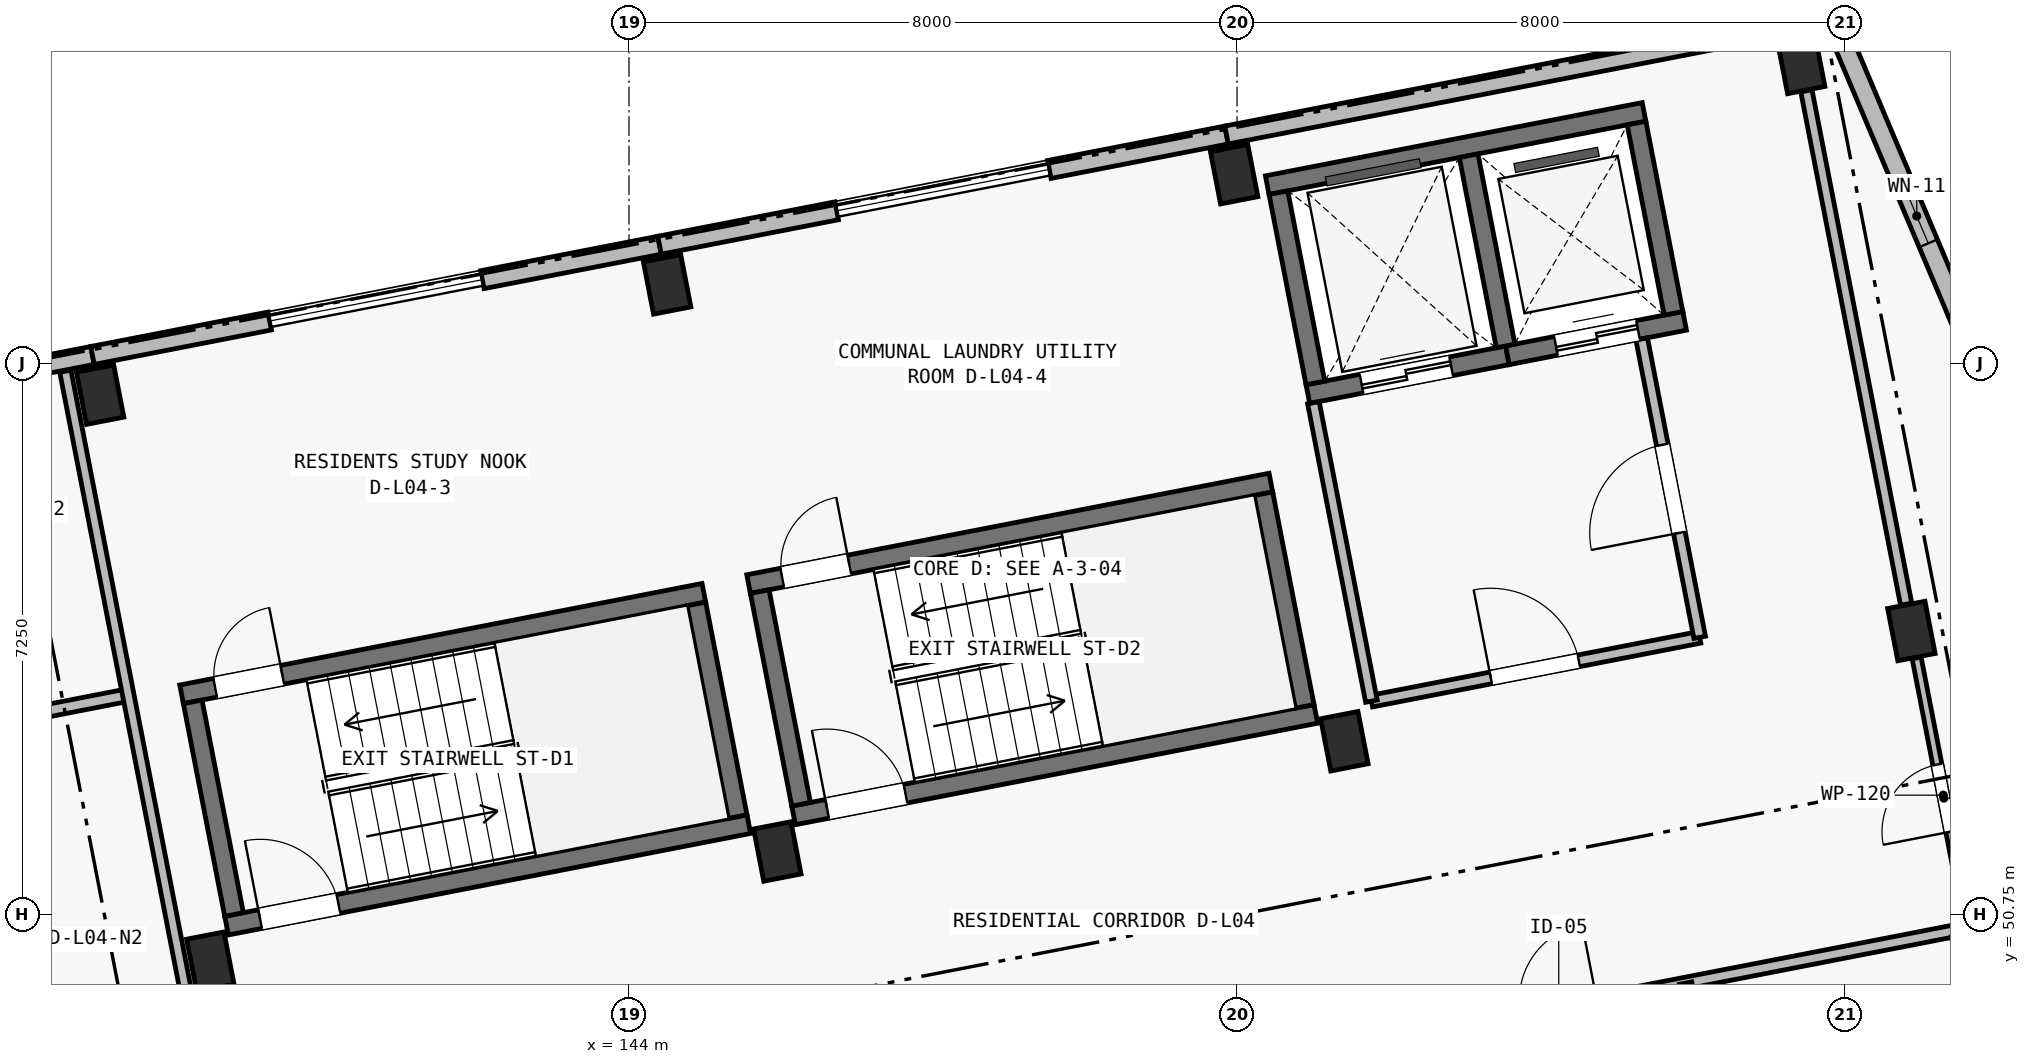
"""IFC4 building model, lengths in metres.
Left out: names, types, materials, properties, quantities, classifications, styles, units other than length and angle.
Written with IfcOpenShell. Run it as: python <this file> out.ifc"""

import sys

from ifc_helpers import new_model, si_unit, direction, frame, frame_2d, origin, origin_2d, place, context, subcontext, project, spatial, rectangle, extrude, element, fill, save


model = new_model("IFC4")
c1 = context("Model", 3, precision=1e-05, world=origin(), true_north=direction((0.0, 1.0)))
c2 = subcontext(c1, "Body", "Model", "MODEL_VIEW")
j1 = project(units=[si_unit("LENGTHUNIT", "METRE"), si_unit("PLANEANGLEUNIT", "RADIAN")], contexts=[c1])
p1 = place(None, origin())
s1 = spatial("IfcSite", under=j1, at=p1, CompositionType="ELEMENT")
p2 = place(p1, origin())
s2 = spatial("IfcBuilding", under=s1, at=p2, CompositionType="ELEMENT")
p3 = place(p2, frame((0.0, 0.0, 14.9)))
s3 = spatial("IfcBuildingStorey", under=s2, at=p3, CompositionType="ELEMENT", Elevation=14.9)
for number, where, z_axis, x_axis in (
    (1, (138.491, 50.13, 0.0), (0.0, 0.0, 1.0), (0.982, 0.191, 0.0)),
    (2, (137.041, 57.59, 0.0), (0.0, 0.0, 1.0), (0.982, 0.191, 0.0)),
    (3, (145.952, 51.58, 0.0), (0.0, 0.0, 1.0), (0.982, 0.191, 0.0)),
    (4, (144.502, 59.041, 0.0), (0.0, 0.0, 1.0), (0.982, 0.191, 0.0)),
    (5, (153.412, 53.03, 0.0), (0.0, 0.0, 1.0), (0.982, 0.191, 0.0)),
    (6, (151.962, 60.491, 0.0), (0.0, 0.0, 1.0), (0.982, 0.191, 0.0)),
    (7, (160.873, 54.48, 0.0), (0.0, 0.0, 1.0), (0.982, 0.191, 0.0)),
    (8, (159.422, 61.941, 0.0), (0.0, 0.0, 1.0), (0.982, 0.191, 0.0)),
):
    element("IfcColumn", number, at=place(p3, frame(where, z_axis=z_axis, x_axis=x_axis)), inside=s3, PredefinedType="COLUMN", context=c2, shape_type="SweptSolid", body=[
        extrude(rectangle(XDim=0.5, YDim=0.7, at=origin_2d()), origin(), (0.0, 0.0, 1.0), 3.25),
    ])
p4 = place(p3, frame((152.397, 60.346, 0.0), z_axis=(0.0, 0.0, 1.0), x_axis=(0.981635261308, 0.190767433692, 0.0)))
e9 = element("IfcWall", 9, at=p4, inside=s3, PredefinedType="SHEAR", context=c2, shape_type="SweptSolid", body=[
    extrude(rectangle(XDim=5.05, YDim=0.25, at=frame_2d((2.525, 0.0))), origin(), (0.0, 0.0, 1.0), 3.25),
])
p5 = place(p3, frame((152.932, 57.598, 0.0), z_axis=(0.0, 0.0, 1.0), x_axis=(0.981636759622, 0.190759723627, 0.0)))
e10 = element("IfcWall", 10, at=p5, inside=s3, PredefinedType="SHEAR", context=c2, shape_type="SweptSolid", body=[
    extrude(rectangle(XDim=2.675, YDim=0.25, at=frame_2d((1.337, 0.0))), origin(), (0.0, 0.0, 1.0), 3.25),
])
p6 = place(p5, frame((0.72, 0.0, 0.0)))
e11 = element("IfcOpeningElement", 11, at=p6, cuts=e10, PredefinedType="OPENING", context=c2, shape_type="SweptSolid", body=[
    extrude(rectangle(XDim=1.2, YDim=2.2, at=frame_2d((0.6, 1.1))), frame((0.0, 0.14, 0.0), z_axis=(0.0, -1.0, 0.0), x_axis=(1.0, 0.0, 0.0)), (0.0, 0.0, 1.0), 0.28),
])
p7 = place(p3, frame((155.558, 58.108, 0.0), z_axis=(0.0, 0.0, 1.0), x_axis=(0.981633573872, 0.190776116556, 0.0)))
e12 = element("IfcWall", 12, at=p7, inside=s3, PredefinedType="SHEAR", context=c2, shape_type="SweptSolid", body=[
    extrude(rectangle(XDim=2.375, YDim=0.25, at=frame_2d((1.188, 0.0))), origin(), (0.0, 0.0, 1.0), 3.25),
])
p8 = place(p7, frame((0.65, 0.0, 0.0)))
e13 = element("IfcOpeningElement", 13, at=p8, cuts=e12, PredefinedType="OPENING", context=c2, shape_type="SweptSolid", body=[
    extrude(rectangle(XDim=1.1, YDim=2.15, at=frame_2d((0.55, 1.075))), frame((0.0, 0.14, 0.0), z_axis=(0.0, -1.0, 0.0), x_axis=(1.0, 0.0, 0.0)), (0.0, 0.0, 1.0), 0.28),
])
for number, where, z_axis, x_axis in (
    (14, (153.031, 57.744, 0.0), (0.0, 0.0, 1.0), (-0.191, 0.982, 0.0)),
    (15, (155.534, 58.231, 0.0), (0.0, 0.0, 1.0), (-0.191, 0.982, 0.0)),
    (16, (157.742, 58.66, 0.0), (0.0, 0.0, 1.0), (-0.191, 0.982, 0.0)),
):
    element("IfcWall", number, at=place(p3, frame(where, z_axis=z_axis, x_axis=x_axis)), inside=s3, PredefinedType="SHEAR", context=c2, shape_type="SweptSolid", body=[
        extrude(rectangle(XDim=2.55, YDim=0.25, at=frame_2d((1.275, 0.0))), origin(), (0.0, 0.0, 1.0), 3.25),
    ])
p9 = place(p3, frame((138.113, 53.647, 0.0), z_axis=(0.0, 0.0, 1.0), x_axis=(0.981626097708, 0.19081458094, 0.0)))
e17 = element("IfcWall", 17, at=p9, inside=s3, PredefinedType="SHEAR", context=c2, shape_type="SweptSolid", body=[
    extrude(rectangle(XDim=7.0, YDim=0.25, at=frame_2d((3.5, 0.0))), origin(), (0.0, 0.0, 1.0), 3.25),
])
p10 = place(p9, frame((0.45, 0.0, 0.0)))
e18 = element("IfcOpeningElement", 18, at=p10, cuts=e17, PredefinedType="OPENING", context=c2, shape_type="SweptSolid", body=[
    extrude(rectangle(XDim=0.9, YDim=2.1, at=frame_2d((0.45, 1.05))), frame((0.0, 0.14, 0.0), z_axis=(0.0, -1.0, 0.0), x_axis=(1.0, 0.0, 0.0)), (0.0, 0.0, 1.0), 0.28),
])
p11 = place(p3, frame((138.705, 50.604, 0.0), z_axis=(0.0, 0.0, 1.0), x_axis=(0.981626097708, 0.19081458094, 0.0)))
e19 = element("IfcWall", 19, at=p11, inside=s3, PredefinedType="SHEAR", context=c2, shape_type="SweptSolid", body=[
    extrude(rectangle(XDim=7.0, YDim=0.25, at=frame_2d((3.5, 0.0))), origin(), (0.0, 0.0, 1.0), 3.25),
])
p12 = place(p11, frame((0.45, 0.0, 0.0)))
e20 = element("IfcOpeningElement", 20, at=p12, cuts=e19, PredefinedType="OPENING", context=c2, shape_type="SweptSolid", body=[
    extrude(rectangle(XDim=1.05, YDim=2.15, at=frame_2d((0.525, 1.075))), frame((0.0, 0.14, 0.0), z_axis=(0.0, -1.0, 0.0), x_axis=(1.0, 0.0, 0.0)), (0.0, 0.0, 1.0), 0.28),
])
p13 = place(p3, frame((138.804, 50.751, 0.0), z_axis=(0.0, 0.0, 1.0), x_axis=(-0.190858194834, 0.981617618762, 0.0)))
e21 = element("IfcWall", 21, at=p13, inside=s3, PredefinedType="SHEAR", context=c2, shape_type="SweptSolid", body=[
    extrude(rectangle(XDim=2.85, YDim=0.25, at=frame_2d((1.425, 0.0))), origin(), (0.0, 0.0, 1.0), 3.25),
])
p14 = place(p3, frame((145.43, 52.039, 0.0), z_axis=(0.0, 0.0, 1.0), x_axis=(-0.190842147128, 0.981620738819, 0.0)))
e22 = element("IfcWall", 22, at=p14, inside=s3, PredefinedType="SHEAR", context=c2, shape_type="SweptSolid", body=[
    extrude(rectangle(XDim=2.85, YDim=0.25, at=frame_2d((1.425, 0.0))), origin(), (0.0, 0.0, 1.0), 3.25),
])
p15 = place(p3, frame((145.574, 55.098, 0.0), z_axis=(0.0, 0.0, 1.0), x_axis=(0.981626097708, 0.19081458094, 0.0)))
e23 = element("IfcWall", 23, at=p15, inside=s3, PredefinedType="SHEAR", context=c2, shape_type="SweptSolid", body=[
    extrude(rectangle(XDim=7.0, YDim=0.25, at=frame_2d((3.5, 0.0))), origin(), (0.0, 0.0, 1.0), 3.25),
])
p16 = place(p15, frame((0.45, 0.0, 0.0)))
e24 = element("IfcOpeningElement", 24, at=p16, cuts=e23, PredefinedType="OPENING", context=c2, shape_type="SweptSolid", body=[
    extrude(rectangle(XDim=0.9, YDim=2.1, at=frame_2d((0.45, 1.05))), frame((0.0, 0.14, 0.0), z_axis=(0.0, -1.0, 0.0), x_axis=(1.0, 0.0, 0.0)), (0.0, 0.0, 1.0), 0.28),
])
p17 = place(p3, frame((146.165, 52.054, 0.0), z_axis=(0.0, 0.0, 1.0), x_axis=(0.981627367538, 0.190808048312, 0.0)))
e25 = element("IfcWall", 25, at=p17, inside=s3, PredefinedType="SHEAR", context=c2, shape_type="SweptSolid", body=[
    extrude(rectangle(XDim=7.0, YDim=0.25, at=frame_2d((3.5, 0.0))), origin(), (0.0, 0.0, 1.0), 3.25),
])
p18 = place(p17, frame((0.45, 0.0, 0.0)))
e26 = element("IfcOpeningElement", 26, at=p18, cuts=e25, PredefinedType="OPENING", context=c2, shape_type="SweptSolid", body=[
    extrude(rectangle(XDim=1.05, YDim=2.15, at=frame_2d((0.525, 1.075))), frame((0.0, 0.14, 0.0), z_axis=(0.0, -1.0, 0.0), x_axis=(1.0, 0.0, 0.0)), (0.0, 0.0, 1.0), 0.28),
])
for number, where, z_axis, x_axis in (
    (27, (146.264, 52.201, 0.0), (0.0, 0.0, 1.0), (-0.191, 0.982, 0.0)),
    (28, (152.89, 53.489, 0.0), (0.0, 0.0, 1.0), (-0.191, 0.982, 0.0)),
):
    element("IfcWall", number, at=place(p3, frame(where, z_axis=z_axis, x_axis=x_axis)), inside=s3, PredefinedType="SHEAR", context=c2, shape_type="SweptSolid", body=[
        extrude(rectangle(XDim=2.85, YDim=0.25, at=frame_2d((1.425, 0.0))), origin(), (0.0, 0.0, 1.0), 3.25),
    ])
p19 = place(p3, frame((129.481, 56.656, 0.0), z_axis=(0.0, 0.0, 1.0), x_axis=(0.981626422232, 0.190812911449, 0.0)))
e29 = element("IfcWall", 29, at=p19, inside=s3, PredefinedType="SOLIDWALL", context=c2, shape_type="SweptSolid", body=[
    extrude(rectangle(XDim=7.6, YDim=0.24, at=frame_2d((3.8, 0.0))), origin(), (0.0, 0.0, 1.0), 3.0),
])
p20 = place(p19, frame((1.745, 0.0, 0.44)))
e30 = element("IfcOpeningElement", 30, at=p20, cuts=e29, PredefinedType="OPENING", context=c2, shape_type="SweptSolid", body=[
    extrude(rectangle(XDim=0.82, YDim=2.18, at=frame_2d((0.41, 1.09))), frame((0.0, 0.135, 0.0), z_axis=(0.0, -1.0, 0.0), x_axis=(1.0, 0.0, 0.0)), (0.0, 0.0, 1.0), 0.27),
])
p21 = place(p19, frame((5.05, 0.0, 0.5)))
e31 = element("IfcOpeningElement", 31, at=p21, cuts=e29, PredefinedType="OPENING", context=c2, shape_type="SweptSolid", body=[
    extrude(rectangle(XDim=0.6, YDim=2.22, at=frame_2d((0.3, 1.11))), frame((0.0, 0.135, 0.0), z_axis=(0.0, -1.0, 0.0), x_axis=(1.0, 0.0, 0.0)), (0.0, 0.0, 1.0), 0.27),
])
for number, where, z_axis, x_axis in (
    (32, (136.941, 58.106, 0.0), (0.0, 0.0, 1.0), (0.982, 0.191, 0.0)),
    (33, (142.07, 59.103, 0.0), (0.0, 0.0, 1.0), (0.982, 0.191, 0.0)),
):
    element("IfcWall", number, at=place(p3, frame(where, z_axis=z_axis, x_axis=x_axis)), inside=s3, PredefinedType="SOLIDWALL", context=c2, shape_type="SweptSolid", body=[
        extrude(rectangle(XDim=2.375, YDim=0.24, at=frame_2d((1.188, 0.0))), origin(), (0.0, 0.0, 1.0), 3.0),
    ])
p22 = place(p3, frame((144.401, 59.556, 0.0), z_axis=(0.0, 0.0, 1.0), x_axis=(0.981633573872, 0.190776116556, 0.0)))
e34 = element("IfcWall", 34, at=p22, inside=s3, PredefinedType="SOLIDWALL", context=c2, shape_type="SweptSolid", body=[
    extrude(rectangle(XDim=2.375, YDim=0.24, at=frame_2d((1.188, 0.0))), origin(), (0.0, 0.0, 1.0), 3.0),
])
p23 = place(p3, frame((149.531, 60.553, 0.0), z_axis=(0.0, 0.0, 1.0), x_axis=(0.98161057432, 0.190894422087, 0.0)))
e35 = element("IfcWall", 35, at=p23, inside=s3, PredefinedType="SOLIDWALL", context=c2, shape_type="SweptSolid", body=[
    extrude(rectangle(XDim=2.375, YDim=0.24, at=frame_2d((1.188, 0.0))), origin(), (0.0, 0.0, 1.0), 3.0),
])
p24 = place(p3, frame((151.862, 61.006, 0.0), z_axis=(0.0, 0.0, 1.0), x_axis=(0.981627273155, 0.190808533872, 0.0)))
e36 = element("IfcWall", 36, at=p24, inside=s3, PredefinedType="SOLIDWALL", context=c2, shape_type="SweptSolid", body=[
    extrude(rectangle(XDim=8.125, YDim=0.24, at=frame_2d((4.062, 0.0))), origin(), (0.0, 0.0, 1.0), 3.0),
])
p25 = place(p3, frame((159.837, 62.556, 0.0), z_axis=(0.0, 0.0, 1.0), x_axis=(0.389225507936, -0.921142499276, 0.0)))
e37 = element("IfcWall", 37, at=p25, inside=s3, PredefinedType="SOLIDWALL", context=c2, shape_type="SweptSolid", body=[
    extrude(rectangle(XDim=17.91, YDim=0.26, at=frame_2d((8.955, 0.0))), origin(), (0.0, 0.0, 1.0), 3.0),
])
p26 = place(p25, frame((2.45, 0.0, 0.45)))
e38 = element("IfcOpeningElement", 38, at=p26, cuts=e37, PredefinedType="OPENING", context=c2, shape_type="SweptSolid", body=[
    extrude(rectangle(XDim=0.78, YDim=2.2, at=frame_2d((0.39, 1.1))), frame((0.0, 0.145, 0.0), z_axis=(0.0, -1.0, 0.0), x_axis=(1.0, 0.0, 0.0)), (0.0, 0.0, 1.0), 0.29),
])
p27 = place(p25, frame((14.84, 0.0, 0.52)))
e39 = element("IfcOpeningElement", 39, at=p27, cuts=e37, PredefinedType="OPENING", context=c2, shape_type="SweptSolid", body=[
    extrude(rectangle(XDim=0.62, YDim=2.28, at=frame_2d((0.31, 1.14))), frame((0.0, 0.145, 0.0), z_axis=(0.0, -1.0, 0.0), x_axis=(1.0, 0.0, 0.0)), (0.0, 0.0, 1.0), 0.29),
])
p28 = place(p3, frame((153.768, 53.558, 0.0), z_axis=(0.0, 0.0, 1.0), x_axis=(0.981624918225, 0.190820648566, 0.0)))
e40 = element("IfcWall", 40, at=p28, inside=s3, PredefinedType="PARTITIONING", context=c2, shape_type="SweptSolid", body=[
    extrude(rectangle(XDim=4.4, YDim=0.155, at=frame_2d((2.2, 0.0))), origin(), (0.0, 0.0, 1.0), 2.97),
])
p29 = place(p28, frame((1.6, 0.0, 0.0)))
e41 = element("IfcOpeningElement", 41, at=p29, cuts=e40, PredefinedType="OPENING", context=c2, shape_type="SweptSolid", body=[
    extrude(rectangle(XDim=1.18, YDim=2.15, at=frame_2d((0.59, 1.075))), frame((0.0, 0.093, 0.0), z_axis=(0.0, -1.0, 0.0), x_axis=(1.0, 0.0, 0.0)), (0.0, 0.0, 1.0), 0.185),
])
p30 = place(p3, frame((153.768, 53.558, 0.0), z_axis=(0.0, 0.0, 1.0), x_axis=(-0.19085495634, 0.981618248425, 0.0)))
e42 = element("IfcWall", 42, at=p30, inside=s3, PredefinedType="PARTITIONING", context=c2, shape_type="SweptSolid", body=[
    extrude(rectangle(XDim=4.0, YDim=0.155, at=frame_2d((2.0, 0.0))), origin(), (0.0, 0.0, 1.0), 2.97),
])
p31 = place(p3, frame((158.087, 54.397, 0.0), z_axis=(0.0, 0.0, 1.0), x_axis=(-0.190796144009, 0.981629681413, 0.0)))
e43 = element("IfcWall", 43, at=p31, inside=s3, PredefinedType="PARTITIONING", context=c2, shape_type="SweptSolid", body=[
    extrude(rectangle(XDim=4.0, YDim=0.155, at=frame_2d((2.0, 0.0))), origin(), (0.0, 0.0, 1.0), 2.97),
])
p32 = place(p31, frame((1.4, 0.0, 0.0)))
e44 = element("IfcOpeningElement", 44, at=p32, cuts=e43, PredefinedType="OPENING", context=c2, shape_type="SweptSolid", body=[
    extrude(rectangle(XDim=1.18, YDim=2.15, at=frame_2d((0.59, 1.075))), frame((0.0, 0.093, 0.0), z_axis=(0.0, -1.0, 0.0), x_axis=(1.0, 0.0, 0.0)), (0.0, 0.0, 1.0), 0.185),
])
p33 = place(p3, frame((161.643, 50.515, 0.0), z_axis=(0.0, 0.0, 1.0), x_axis=(-0.190805731561, 0.981627817864, 0.0)))
e45 = element("IfcWall", 45, at=p33, inside=s3, PredefinedType="PARTITIONING", context=c2, shape_type="SweptSolid", body=[
    extrude(rectangle(XDim=3.68, YDim=0.12, at=frame_2d((1.84, 0.0))), origin(), (0.0, 0.0, 1.0), 2.5),
])
p34 = place(p33, frame((1.35, 0.0, 0.0)))
e46 = element("IfcOpeningElement", 46, at=p34, cuts=e45, PredefinedType="OPENING", context=c2, shape_type="SweptSolid", body=[
    extrude(rectangle(XDim=0.9, YDim=2.1, at=frame_2d((0.45, 1.05))), frame((0.0, 0.075, 0.0), z_axis=(0.0, -1.0, 0.0), x_axis=(1.0, 0.0, 0.0)), (0.0, 0.0, 1.0), 0.15),
])
p35 = place(p3, frame((160.804, 54.834, 0.0), z_axis=(0.0, 0.0, 1.0), x_axis=(-0.190804123115, 0.981628130507, 0.0)))
e47 = element("IfcWall", 47, at=p35, inside=s3, PredefinedType="PARTITIONING", context=c2, shape_type="SweptSolid", body=[
    extrude(rectangle(XDim=6.88, YDim=0.15, at=frame_2d((3.44, 0.0))), origin(), (0.0, 0.0, 1.0), 2.5),
])
p36 = place(p3, frame((154.427, 49.173, 0.0), z_axis=(0.0, 0.0, 1.0), x_axis=(0.981626748283, 0.190811234092, 0.0)))
e48 = element("IfcWall", 48, at=p36, inside=s3, PredefinedType="PARTITIONING", context=c2, shape_type="SweptSolid", body=[
    extrude(rectangle(XDim=7.27, YDim=0.155, at=frame_2d((3.635, 0.0))), origin(), (0.0, 0.0, 1.0), 2.97),
])
p37 = place(p36, frame((1.33, 0.0, 0.0)))
e49 = element("IfcOpeningElement", 49, at=p37, cuts=e48, PredefinedType="OPENING", context=c2, shape_type="SweptSolid", body=[
    extrude(rectangle(XDim=1.02, YDim=2.2, at=frame_2d((0.51, 1.1))), frame((0.0, 0.093, 0.0), z_axis=(0.0, -1.0, 0.0), x_axis=(1.0, 0.0, 0.0)), (0.0, 0.0, 1.0), 0.185),
])
p38 = place(p3, frame((158.612, 46.197, 0.0), z_axis=(0.0, 0.0, 1.0), x_axis=(-0.190850336204, 0.981619146701, 0.0)))
e50 = element("IfcWall", 50, at=p38, inside=s3, PredefinedType="PLUMBINGWALL", context=c2, shape_type="SweptSolid", body=[
    extrude(rectangle(XDim=3.72, YDim=0.165, at=frame_2d((1.86, 0.0))), origin(), (0.0, 0.0, 1.0), 2.97),
])
p39 = place(p3, frame((134.065, 52.988, 0.0), z_axis=(0.0, 0.0, 1.0), x_axis=(0.981629173664, 0.190798756314, 0.0)))
e51 = element("IfcWall", 51, at=p39, inside=s3, PredefinedType="PLUMBINGWALL", context=c2, shape_type="SweptSolid", body=[
    extrude(rectangle(XDim=3.41, YDim=0.165, at=frame_2d((1.705, 0.0))), origin(), (0.0, 0.0, 1.0), 2.97),
])
p40 = place(p39, frame((1.295, 0.0, 0.0)))
e52 = element("IfcOpeningElement", 52, at=p40, cuts=e51, PredefinedType="OPENING", context=c2, shape_type="SweptSolid", body=[
    extrude(rectangle(XDim=0.82, YDim=2.08, at=frame_2d((0.41, 1.04))), frame((0.0, 0.097, 0.0), z_axis=(0.0, -1.0, 0.0), x_axis=(1.0, 0.0, 0.0)), (0.0, 0.0, 1.0), 0.195),
])
p41 = place(p3, frame((138.467, 48.21, 0.0), z_axis=(0.0, 0.0, 1.0), x_axis=(-0.190814044018, 0.981626202078, 0.0)))
e53 = element("IfcWall", 53, at=p41, inside=s3, PredefinedType="PARTITIONING", context=c2, shape_type="SweptSolid", body=[
    extrude(rectangle(XDim=9.87, YDim=0.15, at=frame_2d((4.935, 0.0))), origin(), (0.0, 0.0, 1.0), 2.97),
])
p42 = place(p26, origin())
e54 = element("IfcWindow", 54, at=p42, inside=s3, PartitioningType="SINGLE_PANEL", PredefinedType="WINDOW", context=c2, shape_type="SweptSolid", body=[
    extrude(rectangle(XDim=0.78, YDim=2.2, at=frame_2d((0.39, 1.1))), frame((0.0, 0.03, 0.0), z_axis=(0.0, -1.0, 0.0), x_axis=(1.0, 0.0, 0.0)), (0.0, 0.0, 1.0), 0.06),
])
fill(e38, e54)
p43 = place(p29, origin())
e55 = element("IfcDoor", 55, at=p43, inside=s3, OperationType="SINGLE_SWING_LEFT", PredefinedType="DOOR", context=c2, shape_type="SweptSolid", body=[
    extrude(rectangle(XDim=1.18, YDim=2.15, at=frame_2d((0.59, 1.075))), frame((0.0, 0.025, 0.0), z_axis=(0.0, -1.0, 0.0), x_axis=(1.0, 0.0, 0.0)), (0.0, 0.0, 1.0), 0.05),
])
fill(e41, e55)
p44 = place(p32, origin())
e56 = element("IfcDoor", 56, at=p44, inside=s3, OperationType="SINGLE_SWING_LEFT", PredefinedType="DOOR", context=c2, shape_type="SweptSolid", body=[
    extrude(rectangle(XDim=1.18, YDim=2.15, at=frame_2d((0.59, 1.075))), frame((0.0, 0.025, 0.0), z_axis=(0.0, -1.0, 0.0), x_axis=(1.0, 0.0, 0.0)), (0.0, 0.0, 1.0), 0.05),
])
fill(e44, e56)
p45 = place(p34, origin())
e57 = element("IfcDoor", 57, at=p45, inside=s3, OperationType="SINGLE_SWING_LEFT", PredefinedType="DOOR", context=c2, shape_type="SweptSolid", body=[
    extrude(rectangle(XDim=0.9, YDim=2.1, at=frame_2d((0.45, 1.05))), frame((0.0, 0.025, 0.0), z_axis=(0.0, -1.0, 0.0), x_axis=(1.0, 0.0, 0.0)), (0.0, 0.0, 1.0), 0.05),
])
fill(e46, e57)
p46 = place(p12, origin())
e58 = element("IfcDoor", 58, at=p46, inside=s3, OperationType="SINGLE_SWING_LEFT", PredefinedType="DOOR", context=c2, shape_type="SweptSolid", body=[
    extrude(rectangle(XDim=1.05, YDim=2.15, at=frame_2d((0.525, 1.075))), frame((0.0, 0.025, 0.0), z_axis=(0.0, -1.0, 0.0), x_axis=(1.0, 0.0, 0.0)), (0.0, 0.0, 1.0), 0.05),
])
fill(e20, e58)
p47 = place(p10, origin())
e59 = element("IfcDoor", 59, at=p47, inside=s3, OperationType="SINGLE_SWING_RIGHT", PredefinedType="DOOR", context=c2, shape_type="SweptSolid", body=[
    extrude(rectangle(XDim=0.9, YDim=2.1, at=frame_2d((0.45, 1.05))), frame((0.0, 0.025, 0.0), z_axis=(0.0, -1.0, 0.0), x_axis=(1.0, 0.0, 0.0)), (0.0, 0.0, 1.0), 0.05),
])
fill(e18, e59)
p48 = place(p18, origin())
e60 = element("IfcDoor", 60, at=p48, inside=s3, OperationType="SINGLE_SWING_LEFT", PredefinedType="DOOR", context=c2, shape_type="SweptSolid", body=[
    extrude(rectangle(XDim=1.05, YDim=2.15, at=frame_2d((0.525, 1.075))), frame((0.0, 0.025, 0.0), z_axis=(0.0, -1.0, 0.0), x_axis=(1.0, 0.0, 0.0)), (0.0, 0.0, 1.0), 0.05),
])
fill(e26, e60)
p49 = place(p16, origin())
e61 = element("IfcDoor", 61, at=p49, inside=s3, OperationType="SINGLE_SWING_RIGHT", PredefinedType="DOOR", context=c2, shape_type="SweptSolid", body=[
    extrude(rectangle(XDim=0.9, YDim=2.1, at=frame_2d((0.45, 1.05))), frame((0.0, 0.025, 0.0), z_axis=(0.0, -1.0, 0.0), x_axis=(1.0, 0.0, 0.0)), (0.0, 0.0, 1.0), 0.05),
])
fill(e24, e61)
p50 = place(p6, origin())
e62 = element("IfcDoor", 62, at=p50, inside=s3, OperationType="DOUBLE_DOOR_SLIDING", PredefinedType="DOOR", context=c2, shape_type="SweptSolid", body=[
    extrude(rectangle(XDim=1.2, YDim=2.2, at=frame_2d((0.6, 1.1))), frame((0.0, 0.025, 0.0), z_axis=(0.0, -1.0, 0.0), x_axis=(1.0, 0.0, 0.0)), (0.0, 0.0, 1.0), 0.05),
])
fill(e11, e62)
p51 = place(p8, origin())
e63 = element("IfcDoor", 63, at=p51, inside=s3, OperationType="DOUBLE_DOOR_SLIDING", PredefinedType="DOOR", context=c2, shape_type="SweptSolid", body=[
    extrude(rectangle(XDim=1.1, YDim=2.15, at=frame_2d((0.55, 1.075))), frame((0.0, 0.025, 0.0), z_axis=(0.0, -1.0, 0.0), x_axis=(1.0, 0.0, 0.0)), (0.0, 0.0, 1.0), 0.05),
])
fill(e13, e63)
save(model, sys.argv[1])
